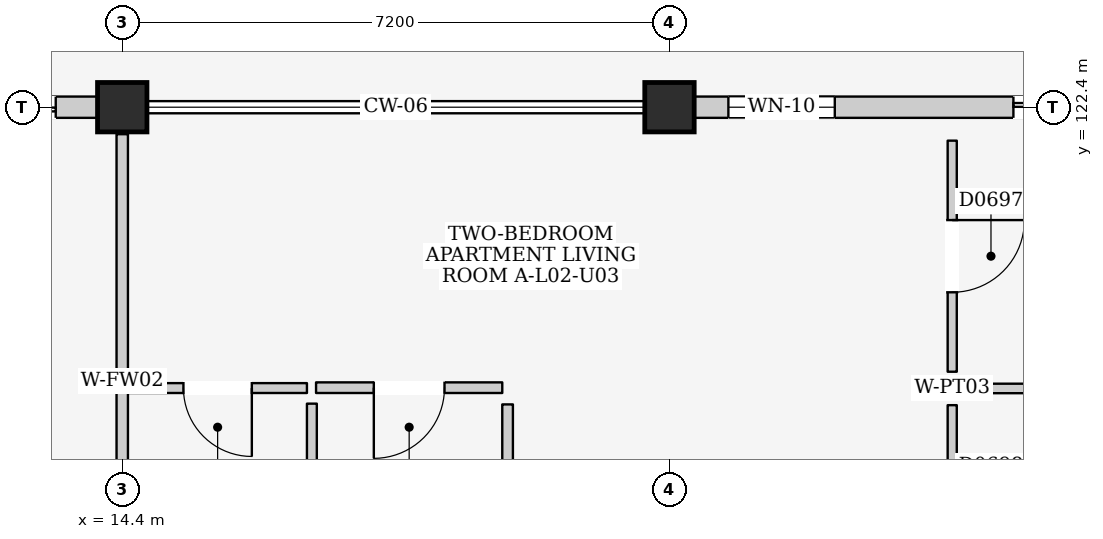
"""IFC4 building model, lengths in metres.
Left out: names, types, materials, properties, quantities, classifications, styles, units other than length and angle.
Written with IfcOpenShell. Run it as: python <this file> out.ifc"""

import sys

from ifc_helpers import new_model, si_unit, direction, frame, frame_2d, origin, origin_2d, place, context, subcontext, project, spatial, rectangle, extrude, element, fill, save


model = new_model("IFC4")
c1 = context("Model", 3, precision=1e-05, world=origin(), true_north=direction((0.0, 1.0)))
c2 = subcontext(c1, "Body", "Model", "MODEL_VIEW")
j1 = project(units=[si_unit("LENGTHUNIT", "METRE"), si_unit("PLANEANGLEUNIT", "RADIAN")], contexts=[c1])
p1 = place(None, origin())
s1 = spatial("IfcSite", under=j1, at=p1, CompositionType="ELEMENT")
p2 = place(p1, origin())
s2 = spatial("IfcBuilding", under=s1, at=p2, CompositionType="ELEMENT")
p3 = place(p2, frame((0.0, 0.0, 9.0)))
s3 = spatial("IfcBuildingStorey", under=s2, at=p3, CompositionType="ELEMENT", Elevation=9.0)
for number, where, z_axis, x_axis in (
    (1, (14.4, 122.4, 0.0), (0.0, 0.0, 1.0), (1.0, 0.0, 0.0)),
    (2, (21.6, 122.4, 0.0), (0.0, 0.0, 1.0), (1.0, 0.0, 0.0)),
):
    element("IfcColumn", number, at=place(p3, frame(where, z_axis=z_axis, x_axis=x_axis)), inside=s3, PredefinedType="COLUMN", context=c2, shape_type="SweptSolid", body=[
        extrude(rectangle(XDim=0.65, YDim=0.65, at=origin_2d()), origin(), (0.0, 0.0, 1.0), 3.2),
    ])
p4 = place(p3, frame((7.525, 122.4, 0.0), z_axis=(0.0, 0.0, 1.0), x_axis=(1.0, 0.0, 0.0)))
e3 = element("IfcWall", 3, at=p4, inside=s3, PredefinedType="ELEMENTEDWALL", context=c2, shape_type="SweptSolid", body=[
    extrude(rectangle(XDim=6.55, YDim=0.28, at=frame_2d((3.275, 0.0))), origin(), (0.0, 0.0, 1.0), 2.425),
])
p5 = place(p4, frame((4.0, 0.0, 0.0)))
e4 = element("IfcOpeningElement", 4, at=p5, cuts=e3, PredefinedType="OPENING", context=c2, shape_type="SweptSolid", body=[
    extrude(rectangle(XDim=2.0, YDim=2.12, at=frame_2d((1.0, 1.06))), frame((0.0, 0.155, 0.0), z_axis=(0.0, -1.0, 0.0), x_axis=(1.0, 0.0, 0.0)), (0.0, 0.0, 1.0), 0.31),
])
p6 = place(p4, frame((0.45, 0.0, 0.665)))
e5 = element("IfcOpeningElement", 5, at=p6, cuts=e3, PredefinedType="OPENING", context=c2, shape_type="SweptSolid", body=[
    extrude(rectangle(XDim=2.4, YDim=1.65, at=frame_2d((1.2, 0.825))), frame((0.0, 0.155, 0.0), z_axis=(0.0, -1.0, 0.0), x_axis=(1.0, 0.0, 0.0)), (0.0, 0.0, 1.0), 0.31),
])
p7 = place(p3, frame((21.925, 122.4, 0.0), z_axis=(0.0, 0.0, 1.0), x_axis=(1.0, 0.0, 0.0)))
e6 = element("IfcWall", 6, at=p7, inside=s3, PredefinedType="ELEMENTEDWALL", context=c2, shape_type="SweptSolid", body=[
    extrude(rectangle(XDim=6.55, YDim=0.28, at=frame_2d((3.275, 0.0))), origin(), (0.0, 0.0, 1.0), 2.425),
])
p8 = place(p7, frame((4.2, 0.0, 0.0)))
e7 = element("IfcOpeningElement", 7, at=p8, cuts=e6, PredefinedType="OPENING", context=c2, shape_type="SweptSolid", body=[
    extrude(rectangle(XDim=1.8, YDim=2.12, at=frame_2d((0.9, 1.06))), frame((0.0, 0.155, 0.0), z_axis=(0.0, -1.0, 0.0), x_axis=(1.0, 0.0, 0.0)), (0.0, 0.0, 1.0), 0.31),
])
p9 = place(p7, frame((0.45, 0.0, 0.9)))
e8 = element("IfcOpeningElement", 8, at=p9, cuts=e6, PredefinedType="OPENING", context=c2, shape_type="SweptSolid", body=[
    extrude(rectangle(XDim=1.4, YDim=1.2, at=frame_2d((0.7, 0.6))), frame((0.0, 0.155, 0.0), z_axis=(0.0, -1.0, 0.0), x_axis=(1.0, 0.0, 0.0)), (0.0, 0.0, 1.0), 0.31),
])
p10 = place(p3, frame((14.4, 115.555, 0.0), z_axis=(0.0, 0.0, 1.0), x_axis=(0.0, 1.0, 0.0)))
e9 = element("IfcWall", 9, at=p10, inside=s3, PredefinedType="PARTITIONING", context=c2, shape_type="SweptSolid", body=[
    extrude(rectangle(XDim=6.49, YDim=0.15, at=frame_2d((3.245, 0.0))), origin(), (0.0, 0.0, 1.0), 2.395),
])
p11 = place(p3, frame((14.48, 118.705, 0.0), z_axis=(0.0, 0.0, 1.0), x_axis=(1.0, 0.0, 0.0)))
e10 = element("IfcWall", 10, at=p11, inside=s3, PredefinedType="PARTITIONING", context=c2, shape_type="SweptSolid", body=[
    extrude(rectangle(XDim=2.35, YDim=0.13, at=frame_2d((1.175, 0.0))), origin(), (0.0, 0.0, 1.0), 2.96),
])
p12 = place(p11, frame((0.725, 0.0, 0.0)))
e11 = element("IfcOpeningElement", 11, at=p12, cuts=e10, PredefinedType="OPENING", context=c2, shape_type="SweptSolid", body=[
    extrude(rectangle(XDim=0.9, YDim=2.1, at=frame_2d((0.45, 1.05))), frame((0.0, 0.08, 0.0), z_axis=(0.0, -1.0, 0.0), x_axis=(1.0, 0.0, 0.0)), (0.0, 0.0, 1.0), 0.16),
])
p13 = place(p3, frame((16.895, 115.46, 0.0), z_axis=(0.0, 0.0, 1.0), x_axis=(0.0, 1.0, 0.0)))
e12 = element("IfcWall", 12, at=p13, inside=s3, PredefinedType="PARTITIONING", context=c2, shape_type="SweptSolid", body=[
    extrude(rectangle(XDim=3.04, YDim=0.13, at=frame_2d((1.52, 0.0))), origin(), (0.0, 0.0, 1.0), 2.96),
])
p14 = place(p3, frame((16.95, 118.71, 0.0), z_axis=(0.0, 0.0, 1.0), x_axis=(1.0, 0.0, 0.0)))
e13 = element("IfcWall", 13, at=p14, inside=s3, PredefinedType="PARTITIONING", context=c2, shape_type="SweptSolid", body=[
    extrude(rectangle(XDim=2.45, YDim=0.14, at=frame_2d((1.225, 0.0))), origin(), (0.0, 0.0, 1.0), 2.96),
])
p15 = place(p14, frame((0.76, 0.0, 0.0)))
e14 = element("IfcOpeningElement", 14, at=p15, cuts=e13, PredefinedType="OPENING", context=c2, shape_type="SweptSolid", body=[
    extrude(rectangle(XDim=0.93, YDim=2.14, at=frame_2d((0.465, 1.07))), frame((0.0, 0.085, 0.0), z_axis=(0.0, -1.0, 0.0), x_axis=(1.0, 0.0, 0.0)), (0.0, 0.0, 1.0), 0.17),
])
p16 = place(p3, frame((19.47, 115.43, 0.0), z_axis=(0.0, 0.0, 1.0), x_axis=(0.0, 1.0, 0.0)))
e15 = element("IfcWall", 15, at=p16, inside=s3, PredefinedType="PARTITIONING", context=c2, shape_type="SweptSolid", body=[
    extrude(rectangle(XDim=3.06, YDim=0.14, at=frame_2d((1.53, 0.0))), origin(), (0.0, 0.0, 1.0), 2.96),
])
p17 = place(p3, frame((25.32, 118.92, 0.0), z_axis=(0.0, 0.0, 1.0), x_axis=(0.0, 1.0, 0.0)))
e16 = element("IfcWall", 16, at=p17, inside=s3, PredefinedType="PARTITIONING", context=c2, shape_type="SweptSolid", body=[
    extrude(rectangle(XDim=3.04, YDim=0.12, at=frame_2d((1.52, 0.0))), origin(), (0.0, 0.0, 1.0), 2.96),
])
p18 = place(p17, frame((1.045, 0.0, 0.0)))
e17 = element("IfcOpeningElement", 17, at=p18, cuts=e16, PredefinedType="OPENING", context=c2, shape_type="SweptSolid", body=[
    extrude(rectangle(XDim=0.95, YDim=2.15, at=frame_2d((0.475, 1.075))), frame((0.0, 0.075, 0.0), z_axis=(0.0, -1.0, 0.0), x_axis=(1.0, 0.0, 0.0)), (0.0, 0.0, 1.0), 0.15),
])
p19 = place(p3, frame((25.52, 118.7, 0.0), z_axis=(0.0, 0.0, 1.0), x_axis=(1.0, 0.0, 0.0)))
e18 = element("IfcWall", 18, at=p19, inside=s3, PredefinedType="PARTITIONING", context=c2, shape_type="SweptSolid", body=[
    extrude(rectangle(XDim=3.06, YDim=0.125, at=frame_2d((1.53, 0.0))), origin(), (0.0, 0.0, 1.0), 2.96),
])
p20 = place(p3, frame((25.32, 115.44, 0.0), z_axis=(0.0, 0.0, 1.0), x_axis=(0.0, 1.0, 0.0)))
e19 = element("IfcWall", 19, at=p20, inside=s3, PredefinedType="PARTITIONING", context=c2, shape_type="SweptSolid", body=[
    extrude(rectangle(XDim=3.04, YDim=0.12, at=frame_2d((1.52, 0.0))), origin(), (0.0, 0.0, 1.0), 2.96),
])
p21 = place(p20, frame((1.04, 0.0, 0.0)))
e20 = element("IfcOpeningElement", 20, at=p21, cuts=e19, PredefinedType="OPENING", context=c2, shape_type="SweptSolid", body=[
    extrude(rectangle(XDim=0.96, YDim=2.15, at=frame_2d((0.48, 1.075))), frame((0.0, 0.075, 0.0), z_axis=(0.0, -1.0, 0.0), x_axis=(1.0, 0.0, 0.0)), (0.0, 0.0, 1.0), 0.15),
])
p22 = place(p5, frame((2.0, 0.0, 0.0), z_axis=(0.0, 0.0, 1.0), x_axis=(-1.0, 0.0, 0.0)))
e21 = element("IfcDoor", 21, at=p22, inside=s3, OperationType="DOUBLE_DOOR_SLIDING", PredefinedType="DOOR", context=c2, shape_type="SweptSolid", body=[
    extrude(rectangle(XDim=2.0, YDim=2.12, at=frame_2d((1.0, 1.06))), frame((0.0, 0.025, 0.0), z_axis=(0.0, -1.0, 0.0), x_axis=(1.0, 0.0, 0.0)), (0.0, 0.0, 1.0), 0.05),
])
fill(e4, e21)
p23 = place(p8, frame((1.8, 0.0, 0.0), z_axis=(0.0, 0.0, 1.0), x_axis=(-1.0, 0.0, 0.0)))
e22 = element("IfcDoor", 22, at=p23, inside=s3, OperationType="SLIDING_TO_LEFT", PredefinedType="DOOR", context=c2, shape_type="SweptSolid", body=[
    extrude(rectangle(XDim=1.8, YDim=2.12, at=frame_2d((0.9, 1.06))), frame((0.0, 0.025, 0.0), z_axis=(0.0, -1.0, 0.0), x_axis=(1.0, 0.0, 0.0)), (0.0, 0.0, 1.0), 0.05),
])
fill(e7, e22)
p24 = place(p9, origin())
e23 = element("IfcWindow", 23, at=p24, inside=s3, PartitioningType="DOUBLE_PANEL_HORIZONTAL", PredefinedType="WINDOW", context=c2, shape_type="SweptSolid", body=[
    extrude(rectangle(XDim=1.4, YDim=1.2, at=frame_2d((0.7, 0.6))), frame((0.0, 0.03, 0.0), z_axis=(0.0, -1.0, 0.0), x_axis=(1.0, 0.0, 0.0)), (0.0, 0.0, 1.0), 0.06),
])
fill(e8, e23)
p25 = place(p12, frame((0.9, 0.0, 0.0), z_axis=(0.0, 0.0, 1.0), x_axis=(-1.0, 0.0, 0.0)))
e24 = element("IfcDoor", 24, at=p25, inside=s3, OperationType="SINGLE_SWING_LEFT", PredefinedType="DOOR", context=c2, shape_type="SweptSolid", body=[
    extrude(rectangle(XDim=0.9, YDim=2.1, at=frame_2d((0.45, 1.05))), frame((0.0, 0.025, 0.0), z_axis=(0.0, -1.0, 0.0), x_axis=(1.0, 0.0, 0.0)), (0.0, 0.0, 1.0), 0.05),
])
fill(e11, e24)
p26 = place(p15, frame((0.93, 0.0, 0.0), z_axis=(0.0, 0.0, 1.0), x_axis=(-1.0, 0.0, 0.0)))
e25 = element("IfcDoor", 25, at=p26, inside=s3, OperationType="SINGLE_SWING_RIGHT", PredefinedType="DOOR", context=c2, shape_type="SweptSolid", body=[
    extrude(rectangle(XDim=0.93, YDim=2.14, at=frame_2d((0.465, 1.07))), frame((0.0, 0.025, 0.0), z_axis=(0.0, -1.0, 0.0), x_axis=(1.0, 0.0, 0.0)), (0.0, 0.0, 1.0), 0.05),
])
fill(e14, e25)
p27 = place(p18, frame((0.95, 0.0, 0.0), z_axis=(0.0, 0.0, 1.0), x_axis=(-1.0, 0.0, 0.0)))
e26 = element("IfcDoor", 26, at=p27, inside=s3, OperationType="SINGLE_SWING_LEFT", PredefinedType="DOOR", context=c2, shape_type="SweptSolid", body=[
    extrude(rectangle(XDim=0.95, YDim=2.15, at=frame_2d((0.475, 1.075))), frame((0.0, 0.025, 0.0), z_axis=(0.0, -1.0, 0.0), x_axis=(1.0, 0.0, 0.0)), (0.0, 0.0, 1.0), 0.05),
])
fill(e17, e26)
save(model, sys.argv[1])
